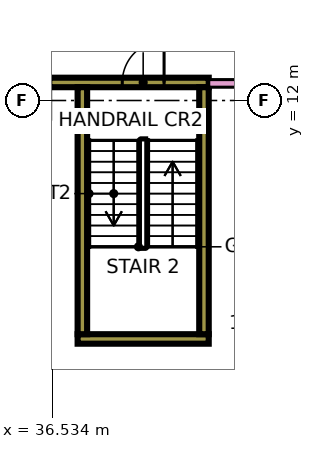
"""IFC4 building model, lengths in metres.
Left out: names, types, materials, properties, quantities, classifications, styles, units other than length and angle.
Written with IfcOpenShell. Run it as: python <this file> out.ifc"""

import sys

from ifc_helpers import new_model, si_unit, direction, frame, frame_2d, origin, place, context, subcontext, project, spatial, rectangle, extrude, element, fill, save


model = new_model("IFC4")
c1 = context("Model", 3, precision=1e-05, world=origin(), true_north=direction((0.0, 1.0)))
c2 = subcontext(c1, "Body", "Model", "MODEL_VIEW")
j1 = project(units=[si_unit("LENGTHUNIT", "METRE"), si_unit("PLANEANGLEUNIT", "RADIAN")], contexts=[c1])
p1 = place(None, origin())
s1 = spatial("IfcSite", under=j1, at=p1, CompositionType="ELEMENT")
p2 = place(p1, origin())
s2 = spatial("IfcBuilding", under=s1, at=p2, CompositionType="ELEMENT")
p3 = place(p2, frame((0.0, 0.0, 157.4)))
s3 = spatial("IfcBuildingStorey", under=s2, at=p3, CompositionType="ELEMENT", Elevation=157.4)
p4 = place(p3, frame((37.2, 5.725, 0.0), z_axis=(0.0, 0.0, 1.0), x_axis=(1.0, 0.0, 0.0)))
e1 = element("IfcWall", 1, at=p4, inside=s3, PredefinedType="SHEAR", context=c2, shape_type="SweptSolid", body=[
    extrude(rectangle(XDim=3.45, YDim=0.25, at=frame_2d((1.725, 0.0))), origin(), (0.0, 0.0, 1.0), 3.75),
])
p5 = place(p3, frame((36.45, 12.475, 0.0), z_axis=(0.0, 0.0, 1.0), x_axis=(1.0, 0.0, 0.0)))
e2 = element("IfcWall", 2, at=p5, inside=s3, PredefinedType="SHEAR", context=c2, shape_type="SweptSolid", body=[
    extrude(rectangle(XDim=4.2, YDim=0.25, at=frame_2d((2.1, 0.0))), origin(), (0.0, 0.0, 1.0), 3.75),
])
p6 = place(p5, frame((1.925, 0.0, 0.0)))
e3 = element("IfcOpeningElement", 3, at=p6, cuts=e2, PredefinedType="OPENING", context=c2, shape_type="SweptSolid", body=[
    extrude(rectangle(XDim=1.1, YDim=2.2, at=frame_2d((0.55, 1.1))), frame((0.0, 0.135, 0.0), z_axis=(0.0, -1.0, 0.0), x_axis=(1.0, 0.0, 0.0)), (0.0, 0.0, 1.0), 0.27),
])
for number, where, z_axis, x_axis in (
    (4, (37.325, 5.85, 0.0), (0.0, 0.0, 1.0), (0.0, 1.0, 0.0)),
    (5, (40.525, 5.85, 0.0), (0.0, 0.0, 1.0), (0.0, 1.0, 0.0)),
):
    element("IfcWall", number, at=place(p3, frame(where, z_axis=z_axis, x_axis=x_axis)), inside=s3, PredefinedType="SHEAR", context=c2, shape_type="SweptSolid", body=[
        extrude(rectangle(XDim=6.5, YDim=0.25, at=frame_2d((3.25, 0.0))), origin(), (0.0, 0.0, 1.0), 3.75),
    ])
p7 = place(p3, frame((40.65, 12.45, 0.0), z_axis=(0.0, 0.0, 1.0), x_axis=(1.0, 0.0, 0.0)))
e6 = element("IfcWall", 6, at=p7, inside=s3, PredefinedType="PARTITIONING", context=c2, shape_type="SweptSolid", body=[
    extrude(rectangle(XDim=22.35, YDim=0.2, at=frame_2d((11.175, 0.0))), origin(), (0.0, 0.0, 1.0), 3.35),
])
p8 = place(p7, frame((20.1, 0.0, 0.0)))
e7 = element("IfcOpeningElement", 7, at=p8, cuts=e6, PredefinedType="OPENING", context=c2, shape_type="SweptSolid", body=[
    extrude(rectangle(XDim=1.0, YDim=2.1, at=frame_2d((0.5, 1.05))), frame((0.0, 0.11, 0.0), z_axis=(0.0, -1.0, 0.0), x_axis=(1.0, 0.0, 0.0)), (0.0, 0.0, 1.0), 0.22),
])
p9 = place(p7, frame((1.05, 0.0, 0.0)))
e8 = element("IfcOpeningElement", 8, at=p9, cuts=e6, PredefinedType="OPENING", context=c2, shape_type="SweptSolid", body=[
    extrude(rectangle(XDim=1.0, YDim=2.1, at=frame_2d((0.5, 1.05))), frame((0.0, 0.11, 0.0), z_axis=(0.0, -1.0, 0.0), x_axis=(1.0, 0.0, 0.0)), (0.0, 0.0, 1.0), 0.22),
])
p10 = place(p6, frame((1.1, 0.0, 0.0), z_axis=(0.0, 0.0, 1.0), x_axis=(-1.0, 0.0, 0.0)))
e9 = element("IfcDoor", 9, at=p10, inside=s3, OperationType="SINGLE_SWING_RIGHT", PredefinedType="DOOR", context=c2, shape_type="SweptSolid", body=[
    extrude(rectangle(XDim=1.1, YDim=2.2, at=frame_2d((0.55, 1.1))), frame((0.0, 0.025, 0.0), z_axis=(0.0, -1.0, 0.0), x_axis=(1.0, 0.0, 0.0)), (0.0, 0.0, 1.0), 0.05),
])
fill(e3, e9)
save(model, sys.argv[1])
